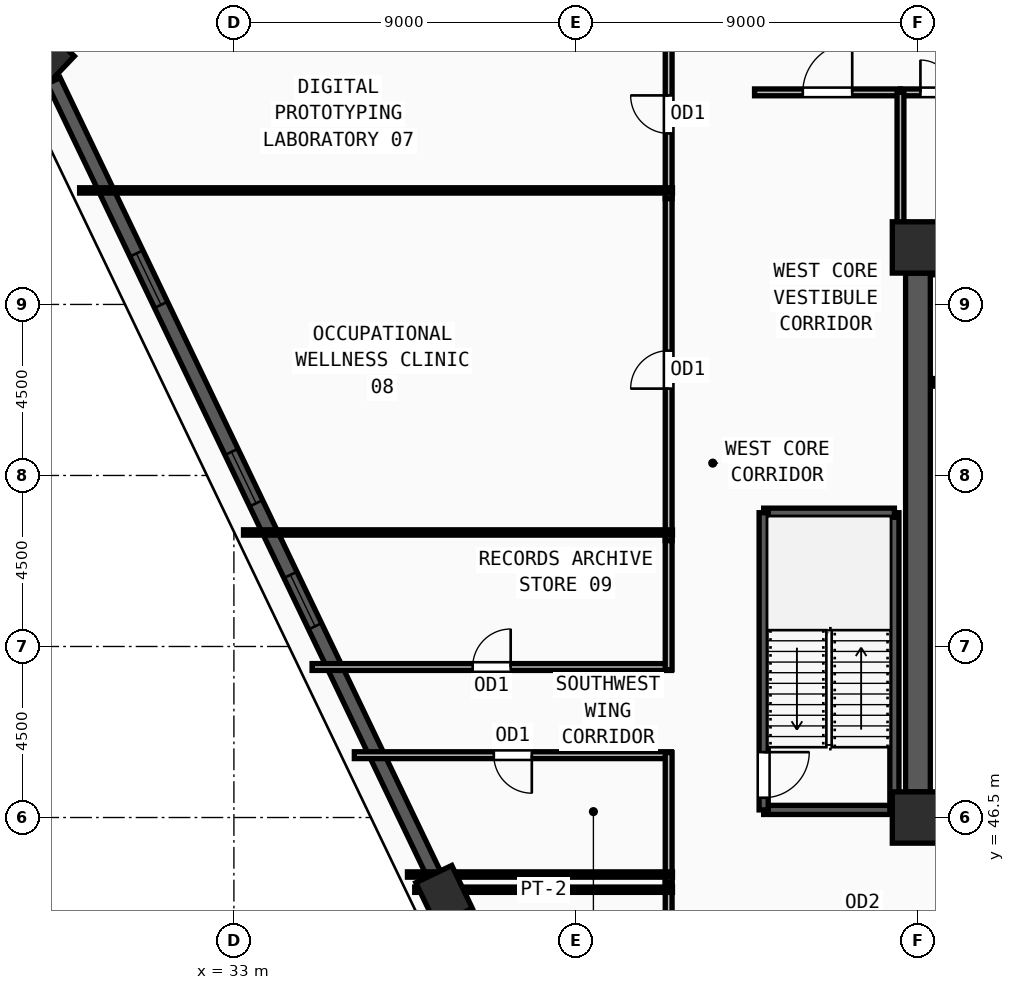
"""IFC4 building model, lengths in metres.
Left out: names, types, materials, properties, quantities, classifications, styles, units other than length and angle.
Written with IfcOpenShell. Run it as: python <this file> out.ifc"""

import sys

from ifc_helpers import new_model, si_unit, direction, frame, frame_2d, origin, origin_2d, place, context, subcontext, project, spatial, rectangle, extrude, source, transform, mapped, element, fill, save


model = new_model("IFC4")
c1 = context("Model", 3, precision=1e-05, world=origin(), true_north=direction((0.0, 1.0)))
c2 = subcontext(c1, "Body", "Model", "MODEL_VIEW")
j1 = project(units=[si_unit("LENGTHUNIT", "METRE"), si_unit("PLANEANGLEUNIT", "RADIAN")], contexts=[c1])
p1 = place(None, origin())
s1 = spatial("IfcSite", under=j1, at=p1, CompositionType="ELEMENT")
p2 = place(p1, origin())
s2 = spatial("IfcBuilding", under=s1, at=p2, CompositionType="ELEMENT")
p3 = place(p2, frame((0.0, 0.0, 247.5)))
s3 = spatial("IfcBuildingStorey", under=s2, at=p3, CompositionType="ELEMENT", Elevation=247.5)
m1 = source(origin(), c2, "Body", "SweptSolid", [
    extrude(rectangle(XDim=1.35, YDim=1.35, at=origin_2d()), origin(), (0.0, 0.0, 1.0), 3.75),
])
for number, where, z_axis, x_axis in (
    (1, (51.0, 46.5, 0.0), (0.0, 0.0, 1.0), (1.0, 0.0, 0.0)),
    (2, (51.0, 61.5, 0.0), (0.0, 0.0, 1.0), (1.0, 0.0, 0.0)),
):
    element("IfcColumn", number, at=place(p3, frame(where, z_axis=z_axis, x_axis=x_axis)), inside=s3, PredefinedType="COLUMN", context=c2, shape_type="MappedRepresentation", body=[
        mapped(m1, transform((0.0, 0.0, 0.0), x_axis=(1.0, 0.0, 0.0), y_axis=(0.0, 1.0, 0.0), z_axis=(0.0, 0.0, 1.0), scale=1.0)),
    ])
m2 = source(origin(), c2, "Body", "SweptSolid", [
    extrude(rectangle(XDim=1.25, YDim=1.05, at=origin_2d()), origin(), (0.0, 0.0, 1.0), 3.75),
])
for number, where, z_axis, x_axis in (
    (3, (38.53, 44.448, 0.0), (0.0, 0.0, 1.0), (-0.432, 0.902, 0.0)),
    (4, (27.99, 66.441, 0.0), (0.0, 0.0, 1.0), (0.689, 0.724, 0.0)),
):
    element("IfcColumn", number, at=place(p3, frame(where, z_axis=z_axis, x_axis=x_axis)), inside=s3, PredefinedType="COLUMN", context=c2, shape_type="MappedRepresentation", body=[
        mapped(m2, transform((0.0, 0.0, 0.0), x_axis=(1.0, 0.0, 0.0), y_axis=(0.0, 1.0, 0.0), z_axis=(0.0, 0.0, 1.0), scale=1.0)),
    ])
p4 = place(p3, frame((28.256, 65.886, 0.0), z_axis=(0.0, 0.0, 1.0), x_axis=(0.432167516052, -0.901793345545, 0.0)))
e5 = element("IfcWall", 5, at=p4, inside=s3, PredefinedType="SOLIDWALL", context=c2, shape_type="SweptSolid", body=[
    extrude(rectangle(XDim=23.157, YDim=0.38, at=frame_2d((11.579, 0.0))), origin(), (0.0, 0.0, 1.0), 3.57),
])
m3 = source(origin(), c2, "Body", "SweptSolid", [
    extrude(rectangle(XDim=1.5, YDim=1.9, at=frame_2d((0.75, 0.95))), frame((0.0, 0.2, 0.0), z_axis=(0.0, -1.0, 0.0), x_axis=(1.0, 0.0, 0.0)), (0.0, 0.0, 1.0), 0.4),
])
p5 = place(p4, frame((5.039, 0.0, 0.55)))
e6 = element("IfcOpeningElement", 6, at=p5, cuts=e5, PredefinedType="OPENING", context=c2, shape_type="MappedRepresentation", body=[
    mapped(m3, transform((0.0, 0.0, 0.0), x_axis=(1.0, 0.0, 0.0), y_axis=(0.0, 1.0, 0.0), z_axis=(0.0, 0.0, 1.0), scale=1.0)),
])
p6 = place(p4, frame((10.829, 0.0, 0.55)))
e7 = element("IfcOpeningElement", 7, at=p6, cuts=e5, PredefinedType="OPENING", context=c2, shape_type="MappedRepresentation", body=[
    mapped(m3, transform((0.0, 0.0, 0.0), x_axis=(1.0, 0.0, 0.0), y_axis=(0.0, 1.0, 0.0), z_axis=(0.0, 0.0, 1.0), scale=1.0)),
])
p7 = place(p4, frame((14.418, 0.0, 0.55)))
e8 = element("IfcOpeningElement", 8, at=p7, cuts=e5, PredefinedType="OPENING", context=c2, shape_type="MappedRepresentation", body=[
    mapped(m3, transform((0.0, 0.0, 0.0), x_axis=(1.0, 0.0, 0.0), y_axis=(0.0, 1.0, 0.0), z_axis=(0.0, 0.0, 1.0), scale=1.0)),
])
p8 = place(p3, frame((51.0, 47.175, 0.0), z_axis=(0.0, 0.0, 1.0), x_axis=(0.0, 1.0, 0.0)))
e9 = element("IfcWall", 9, at=p8, inside=s3, PredefinedType="SHEAR", context=c2, shape_type="SweptSolid", body=[
    extrude(rectangle(XDim=13.65, YDim=0.65, at=frame_2d((6.825, 0.0))), origin(), (0.0, 0.0, 1.0), 3.57),
])
p9 = place(p3, frame((46.94, 46.7, 0.0), z_axis=(0.0, 0.0, 1.0), x_axis=(1.0, 0.0, 0.0)))
e10 = element("IfcWall", 10, at=p9, inside=s3, PredefinedType="SOLIDWALL", context=c2, shape_type="SweptSolid", body=[
    extrude(rectangle(XDim=3.44, YDim=0.24, at=frame_2d((1.72, 0.0))), origin(), (0.0, 0.0, 1.0), 3.57),
])
p10 = place(p3, frame((50.38, 46.7, 0.0), z_axis=(0.0, 0.0, 1.0), x_axis=(0.0, 1.0, 0.0)))
e11 = element("IfcWall", 11, at=p10, inside=s3, PredefinedType="SOLIDWALL", context=c2, shape_type="SweptSolid", body=[
    extrude(rectangle(XDim=7.82, YDim=0.24, at=frame_2d((3.91, 0.0))), origin(), (0.0, 0.0, 1.0), 3.57),
])
p11 = place(p3, frame((50.38, 54.52, 0.0), z_axis=(0.0, 0.0, 1.0), x_axis=(-1.0, 0.0, 0.0)))
e12 = element("IfcWall", 12, at=p11, inside=s3, PredefinedType="SOLIDWALL", context=c2, shape_type="SweptSolid", body=[
    extrude(rectangle(XDim=3.44, YDim=0.24, at=frame_2d((1.72, 0.0))), origin(), (0.0, 0.0, 1.0), 3.57),
])
p12 = place(p3, frame((46.94, 54.52, 0.0), z_axis=(0.0, 0.0, 1.0), x_axis=(0.0, -1.0, 0.0)))
e13 = element("IfcWall", 13, at=p12, inside=s3, PredefinedType="SOLIDWALL", context=c2, shape_type="SweptSolid", body=[
    extrude(rectangle(XDim=7.82, YDim=0.24, at=frame_2d((3.91, 0.0))), origin(), (0.0, 0.0, 1.0), 3.57),
])
m4 = source(origin(), c2, "Body", "SweptSolid", [
    extrude(rectangle(XDim=1.2, YDim=2.2, at=frame_2d((0.6, 1.1))), frame((0.0, 0.13, 0.0), z_axis=(0.0, -1.0, 0.0), x_axis=(1.0, 0.0, 0.0)), (0.0, 0.0, 1.0), 0.26),
])
p13 = place(p12, frame((6.3, 0.0, 0.0)))
e14 = element("IfcOpeningElement", 14, at=p13, cuts=e13, PredefinedType="OPENING", context=c2, shape_type="MappedRepresentation", body=[
    mapped(m4, transform((0.0, 0.0, 0.0), x_axis=(1.0, 0.0, 0.0), y_axis=(0.0, 1.0, 0.0), z_axis=(0.0, 0.0, 1.0), scale=1.0)),
])
for number, where, z_axis, x_axis in (
    (15, (51.4, 57.95, 0.0), (0.0, 0.0, 1.0), (1.0, 0.0, 0.0)),
    (16, (53.8, 60.88, 0.0), (0.0, 0.0, 1.0), (-1.0, 0.0, 0.0)),
):
    element("IfcWall", number, at=place(p3, frame(where, z_axis=z_axis, x_axis=x_axis)), inside=s3, PredefinedType="SOLIDWALL", context=c2, shape_type="SweptSolid", body=[
        extrude(rectangle(XDim=2.4, YDim=0.2, at=frame_2d((1.2, 0.0))), origin(), (0.0, 0.0, 1.0), 3.57),
    ])
p14 = place(p3, frame((50.54, 65.58, 0.0), z_axis=(0.0, 0.0, 1.0), x_axis=(1.0, 0.0, 0.0)))
e17 = element("IfcWall", 17, at=p14, inside=s3, PredefinedType="PARTITIONING", context=c2, shape_type="SweptSolid", body=[
    extrude(rectangle(XDim=1.9, YDim=0.18, at=frame_2d((0.95, 0.0))), origin(), (0.0, 0.0, 1.0), 3.57),
])
m5 = source(origin(), c2, "Body", "SweptSolid", [
    extrude(rectangle(XDim=0.85, YDim=2.1, at=frame_2d((0.425, 1.05))), frame((0.0, 0.1, 0.0), z_axis=(0.0, -1.0, 0.0), x_axis=(1.0, 0.0, 0.0)), (0.0, 0.0, 1.0), 0.2),
])
p15 = place(p14, frame((0.525, 0.0, 0.0)))
e18 = element("IfcOpeningElement", 18, at=p15, cuts=e17, PredefinedType="OPENING", context=c2, shape_type="MappedRepresentation", body=[
    mapped(m5, transform((0.0, 0.0, 0.0), x_axis=(1.0, 0.0, 0.0), y_axis=(0.0, 1.0, 0.0), z_axis=(0.0, 0.0, 1.0), scale=1.0)),
])
p16 = place(p3, frame((46.7, 65.58, 0.0), z_axis=(0.0, 0.0, 1.0), x_axis=(1.0, 0.0, 0.0)))
e19 = element("IfcWall", 19, at=p16, inside=s3, PredefinedType="PARTITIONING", context=c2, shape_type="SweptSolid", body=[
    extrude(rectangle(XDim=3.84, YDim=0.18, at=frame_2d((1.92, 0.0))), origin(), (0.0, 0.0, 1.0), 3.57),
])
m6 = source(origin(), c2, "Body", "SweptSolid", [
    extrude(rectangle(XDim=1.3, YDim=2.2, at=frame_2d((0.65, 1.1))), frame((0.0, 0.1, 0.0), z_axis=(0.0, -1.0, 0.0), x_axis=(1.0, 0.0, 0.0)), (0.0, 0.0, 1.0), 0.2),
])
p17 = place(p16, frame((1.27, 0.0, 0.0)))
e20 = element("IfcOpeningElement", 20, at=p17, cuts=e19, PredefinedType="OPENING", context=c2, shape_type="MappedRepresentation", body=[
    mapped(m6, transform((0.0, 0.0, 0.0), x_axis=(1.0, 0.0, 0.0), y_axis=(0.0, 1.0, 0.0), z_axis=(0.0, 0.0, 1.0), scale=1.0)),
])
p18 = place(p3, frame((44.44, 62.785, 0.0), z_axis=(0.0, 0.0, 1.0), x_axis=(0.0, 1.0, 0.0)))
e21 = element("IfcWall", 21, at=p18, inside=s3, PredefinedType="PARTITIONING", context=c2, shape_type="SweptSolid", body=[
    extrude(rectangle(XDim=4.43, YDim=0.18, at=frame_2d((2.215, 0.0))), origin(), (0.0, 0.0, 1.0), 3.57),
])
m7 = source(origin(), c2, "Body", "SweptSolid", [
    extrude(rectangle(XDim=1.0, YDim=2.2, at=frame_2d((0.5, 1.1))), frame((0.0, 0.1, 0.0), z_axis=(0.0, -1.0, 0.0), x_axis=(1.0, 0.0, 0.0)), (0.0, 0.0, 1.0), 0.2),
])
p19 = place(p18, frame((1.715, 0.0, 0.0)))
e22 = element("IfcOpeningElement", 22, at=p19, cuts=e21, PredefinedType="OPENING", context=c2, shape_type="MappedRepresentation", body=[
    mapped(m7, transform((0.0, 0.0, 0.0), x_axis=(1.0, 0.0, 0.0), y_axis=(0.0, 1.0, 0.0), z_axis=(0.0, 0.0, 1.0), scale=1.0)),
])
p20 = place(p3, frame((44.44, 53.785, 0.0), z_axis=(0.0, 0.0, 1.0), x_axis=(0.0, 1.0, 0.0)))
e23 = element("IfcWall", 23, at=p20, inside=s3, PredefinedType="PARTITIONING", context=c2, shape_type="SweptSolid", body=[
    extrude(rectangle(XDim=9.0, YDim=0.18, at=frame_2d((4.5, 0.0))), origin(), (0.0, 0.0, 1.0), 3.57),
])
p21 = place(p20, frame((4.0, 0.0, 0.0)))
e24 = element("IfcOpeningElement", 24, at=p21, cuts=e23, PredefinedType="OPENING", context=c2, shape_type="MappedRepresentation", body=[
    mapped(m7, transform((0.0, 0.0, 0.0), x_axis=(1.0, 0.0, 0.0), y_axis=(0.0, 1.0, 0.0), z_axis=(0.0, 0.0, 1.0), scale=1.0)),
])
p22 = place(p3, frame((35.057, 50.46, 0.0), z_axis=(0.0, 0.0, 1.0), x_axis=(1.0, 0.0, 0.0)))
e25 = element("IfcWall", 25, at=p22, inside=s3, PredefinedType="PARTITIONING", context=c2, shape_type="SweptSolid", body=[
    extrude(rectangle(XDim=9.453, YDim=0.18, at=frame_2d((4.727, 0.0))), origin(), (0.0, 0.0, 1.0), 3.57),
])
p23 = place(p22, frame((4.226, 0.0, 0.0)))
e26 = element("IfcOpeningElement", 26, at=p23, cuts=e25, PredefinedType="OPENING", context=c2, shape_type="MappedRepresentation", body=[
    mapped(m7, transform((0.0, 0.0, 0.0), x_axis=(1.0, 0.0, 0.0), y_axis=(0.0, 1.0, 0.0), z_axis=(0.0, 0.0, 1.0), scale=1.0)),
])
p24 = place(p3, frame((44.51, 48.14, 0.0), z_axis=(0.0, 0.0, 1.0), x_axis=(-1.0, 0.0, 0.0)))
e27 = element("IfcWall", 27, at=p24, inside=s3, PredefinedType="PARTITIONING", context=c2, shape_type="SweptSolid", body=[
    extrude(rectangle(XDim=8.341, YDim=0.18, at=frame_2d((4.17, 0.0))), origin(), (0.0, 0.0, 1.0), 3.57),
])
p25 = place(p24, frame((3.671, 0.0, 0.0)))
e28 = element("IfcOpeningElement", 28, at=p25, cuts=e27, PredefinedType="OPENING", context=c2, shape_type="MappedRepresentation", body=[
    mapped(m7, transform((0.0, 0.0, 0.0), x_axis=(1.0, 0.0, 0.0), y_axis=(0.0, 1.0, 0.0), z_axis=(0.0, 0.0, 1.0), scale=1.0)),
])
p26 = place(p3, frame((50.54, 61.95, 0.0), z_axis=(0.0, 0.0, 1.0), x_axis=(0.0, 1.0, 0.0)))
e29 = element("IfcWall", 29, at=p26, inside=s3, PredefinedType="PARTITIONING", context=c2, shape_type="SweptSolid", body=[
    extrude(rectangle(XDim=3.63, YDim=0.18, at=frame_2d((1.815, 0.0))), origin(), (0.0, 0.0, 1.0), 3.57),
])
p27 = place(p3, frame((44.44, 50.39, 0.0), z_axis=(0.0, 0.0, 1.0), x_axis=(0.0, 1.0, 0.0)))
e30 = element("IfcWall", 30, at=p27, inside=s3, PredefinedType="PARTITIONING", context=c2, shape_type="SweptSolid", body=[
    extrude(rectangle(XDim=3.395, YDim=0.18, at=frame_2d((1.698, 0.0))), origin(), (0.0, 0.0, 1.0), 3.205),
])
p28 = place(p3, frame((44.44, 44.785, 0.0), z_axis=(0.0, 0.0, 1.0), x_axis=(0.0, 1.0, 0.0)))
e31 = element("IfcWall", 31, at=p28, inside=s3, PredefinedType="PARTITIONING", context=c2, shape_type="SweptSolid", body=[
    extrude(rectangle(XDim=3.425, YDim=0.18, at=frame_2d((1.712, 0.0))), origin(), (0.0, 0.0, 1.0), 3.57),
])
p29 = place(p3, frame((44.44, 43.67, 0.0), z_axis=(0.0, 0.0, 1.0), x_axis=(0.0, 1.0, 0.0)))
e32 = element("IfcWall", 32, at=p29, inside=s3, PredefinedType="PARTITIONING", context=c2, shape_type="SweptSolid", body=[
    extrude(rectangle(XDim=1.115, YDim=0.18, at=frame_2d((0.558, 0.0))), origin(), (0.0, 0.0, 1.0), 3.57),
])
p30 = place(p3, frame((44.54, 44.6, 0.0), z_axis=(0.0, 0.0, 1.0), x_axis=(-1.0, 0.0, 0.0)))
e33 = element("IfcWall", 33, at=p30, inside=s3, PredefinedType="PARTITIONING", context=c2, shape_type="SweptSolid", body=[
    extrude(rectangle(XDim=6.782, YDim=0.14, at=frame_2d((3.391, 0.0))), origin(), (0.0, 0.0, 1.0), 3.57),
])
p31 = place(p3, frame((44.54, 45.0, 0.0), z_axis=(0.0, 0.0, 1.0), x_axis=(-1.0, 0.0, 0.0)))
e34 = element("IfcWall", 34, at=p31, inside=s3, PredefinedType="PARTITIONING", context=c2, shape_type="SweptSolid", body=[
    extrude(rectangle(XDim=6.973, YDim=0.14, at=frame_2d((3.487, 0.0))), origin(), (0.0, 0.0, 1.0), 3.57),
])
p32 = place(p3, frame((44.54, 54.0, 0.0), z_axis=(0.0, 0.0, 1.0), x_axis=(-1.0, 0.0, 0.0)))
e35 = element("IfcWall", 35, at=p32, inside=s3, PredefinedType="PARTITIONING", context=c2, shape_type="SweptSolid", body=[
    extrude(rectangle(XDim=11.287, YDim=0.14, at=frame_2d((5.644, 0.0))), origin(), (0.0, 0.0, 1.0), 3.57),
])
p33 = place(p3, frame((44.54, 63.0, 0.0), z_axis=(0.0, 0.0, 1.0), x_axis=(-1.0, 0.0, 0.0)))
e36 = element("IfcWall", 36, at=p33, inside=s3, PredefinedType="PARTITIONING", context=c2, shape_type="SweptSolid", body=[
    extrude(rectangle(XDim=15.6, YDim=0.14, at=frame_2d((7.8, 0.0))), origin(), (0.0, 0.0, 1.0), 2.855),
])
m8 = source(origin(), c2, "Body", "SweptSolid", [
    extrude(rectangle(XDim=1.5, YDim=1.9, at=frame_2d((0.75, 0.95))), frame((0.0, 0.03, 0.0), z_axis=(0.0, -1.0, 0.0), x_axis=(1.0, 0.0, 0.0)), (0.0, 0.0, 1.0), 0.06),
])
p34 = place(p5, origin())
e37 = element("IfcWindow", 37, at=p34, inside=s3, PartitioningType="DOUBLE_PANEL_VERTICAL", PredefinedType="WINDOW", context=c2, shape_type="MappedRepresentation", body=[
    mapped(m8, transform((0.0, 0.0, 0.0), x_axis=(1.0, 0.0, 0.0), y_axis=(0.0, 1.0, 0.0), z_axis=(0.0, 0.0, 1.0), scale=1.0)),
])
fill(e6, e37)
p35 = place(p6, origin())
e38 = element("IfcWindow", 38, at=p35, inside=s3, PartitioningType="DOUBLE_PANEL_VERTICAL", PredefinedType="WINDOW", context=c2, shape_type="MappedRepresentation", body=[
    mapped(m8, transform((0.0, 0.0, 0.0), x_axis=(1.0, 0.0, 0.0), y_axis=(0.0, 1.0, 0.0), z_axis=(0.0, 0.0, 1.0), scale=1.0)),
])
fill(e7, e38)
p36 = place(p7, origin())
e39 = element("IfcWindow", 39, at=p36, inside=s3, PartitioningType="DOUBLE_PANEL_VERTICAL", PredefinedType="WINDOW", context=c2, shape_type="MappedRepresentation", body=[
    mapped(m8, transform((0.0, 0.0, 0.0), x_axis=(1.0, 0.0, 0.0), y_axis=(0.0, 1.0, 0.0), z_axis=(0.0, 0.0, 1.0), scale=1.0)),
])
fill(e8, e39)
m9 = source(origin(), c2, "Body", "SweptSolid", [
    extrude(rectangle(XDim=1.2, YDim=2.2, at=frame_2d((0.6, 1.1))), frame((0.0, 0.025, 0.0), z_axis=(0.0, -1.0, 0.0), x_axis=(1.0, 0.0, 0.0)), (0.0, 0.0, 1.0), 0.05),
])
p37 = place(p13, origin())
e40 = element("IfcDoor", 40, at=p37, inside=s3, OperationType="SINGLE_SWING_LEFT", PredefinedType="DOOR", context=c2, shape_type="MappedRepresentation", body=[
    mapped(m9, transform((0.0, 0.0, 0.0), x_axis=(1.0, 0.0, 0.0), y_axis=(0.0, 1.0, 0.0), z_axis=(0.0, 0.0, 1.0), scale=1.0)),
])
fill(e14, e40)
m10 = source(origin(), c2, "Body", "SweptSolid", [
    extrude(rectangle(XDim=0.85, YDim=2.1, at=frame_2d((0.425, 1.05))), frame((0.0, 0.025, 0.0), z_axis=(0.0, -1.0, 0.0), x_axis=(1.0, 0.0, 0.0)), (0.0, 0.0, 1.0), 0.05),
])
p38 = place(p15, origin())
e41 = element("IfcDoor", 41, at=p38, inside=s3, OperationType="SINGLE_SWING_LEFT", PredefinedType="DOOR", context=c2, shape_type="MappedRepresentation", body=[
    mapped(m10, transform((0.0, 0.0, 0.0), x_axis=(1.0, 0.0, 0.0), y_axis=(0.0, 1.0, 0.0), z_axis=(0.0, 0.0, 1.0), scale=1.0)),
])
fill(e18, e41)
m11 = source(origin(), c2, "Body", "SweptSolid", [
    extrude(rectangle(XDim=1.3, YDim=2.2, at=frame_2d((0.65, 1.1))), frame((0.0, 0.025, 0.0), z_axis=(0.0, -1.0, 0.0), x_axis=(1.0, 0.0, 0.0)), (0.0, 0.0, 1.0), 0.05),
])
p39 = place(p17, origin())
e42 = element("IfcDoor", 42, at=p39, inside=s3, OperationType="SINGLE_SWING_RIGHT", PredefinedType="DOOR", context=c2, shape_type="MappedRepresentation", body=[
    mapped(m11, transform((0.0, 0.0, 0.0), x_axis=(1.0, 0.0, 0.0), y_axis=(0.0, 1.0, 0.0), z_axis=(0.0, 0.0, 1.0), scale=1.0)),
])
fill(e20, e42)
m12 = source(origin(), c2, "Body", "SweptSolid", [
    extrude(rectangle(XDim=1.0, YDim=2.2, at=frame_2d((0.5, 1.1))), frame((0.0, 0.025, 0.0), z_axis=(0.0, -1.0, 0.0), x_axis=(1.0, 0.0, 0.0)), (0.0, 0.0, 1.0), 0.05),
])
p40 = place(p19, origin())
e43 = element("IfcDoor", 43, at=p40, inside=s3, OperationType="SINGLE_SWING_RIGHT", PredefinedType="DOOR", context=c2, shape_type="MappedRepresentation", body=[
    mapped(m12, transform((0.0, 0.0, 0.0), x_axis=(1.0, 0.0, 0.0), y_axis=(0.0, 1.0, 0.0), z_axis=(0.0, 0.0, 1.0), scale=1.0)),
])
fill(e22, e43)
p41 = place(p21, origin())
e44 = element("IfcDoor", 44, at=p41, inside=s3, OperationType="SINGLE_SWING_LEFT", PredefinedType="DOOR", context=c2, shape_type="MappedRepresentation", body=[
    mapped(m12, transform((0.0, 0.0, 0.0), x_axis=(1.0, 0.0, 0.0), y_axis=(0.0, 1.0, 0.0), z_axis=(0.0, 0.0, 1.0), scale=1.0)),
])
fill(e24, e44)
p42 = place(p23, origin())
e45 = element("IfcDoor", 45, at=p42, inside=s3, OperationType="SINGLE_SWING_RIGHT", PredefinedType="DOOR", context=c2, shape_type="MappedRepresentation", body=[
    mapped(m12, transform((0.0, 0.0, 0.0), x_axis=(1.0, 0.0, 0.0), y_axis=(0.0, 1.0, 0.0), z_axis=(0.0, 0.0, 1.0), scale=1.0)),
])
fill(e26, e45)
p43 = place(p25, origin())
e46 = element("IfcDoor", 46, at=p43, inside=s3, OperationType="SINGLE_SWING_LEFT", PredefinedType="DOOR", context=c2, shape_type="MappedRepresentation", body=[
    mapped(m12, transform((0.0, 0.0, 0.0), x_axis=(1.0, 0.0, 0.0), y_axis=(0.0, 1.0, 0.0), z_axis=(0.0, 0.0, 1.0), scale=1.0)),
])
fill(e28, e46)
save(model, sys.argv[1])
